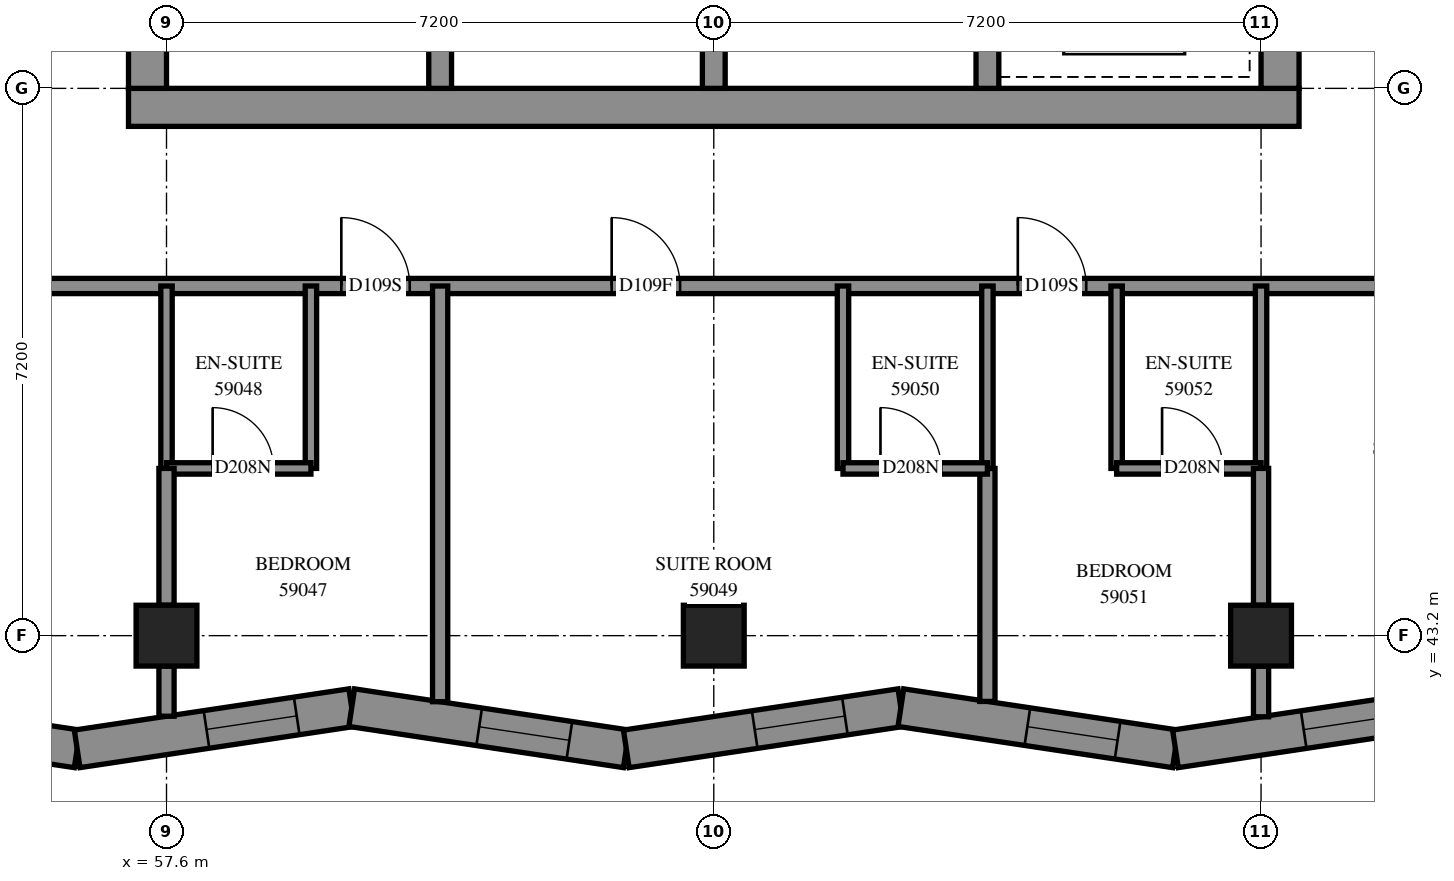
"""IFC4 building model, lengths in metres.
Left out: names, types, materials, properties, quantities, classifications, styles, units other than length and angle.
Written with IfcOpenShell. Run it as: python <this file> out.ifc"""

import sys

from ifc_helpers import new_model, si_unit, direction, frame, frame_2d, origin, origin_2d, place, context, subcontext, project, spatial, polyline, rectangle, outline, extrude, element, fill, save


model = new_model("IFC4")
c1 = context("Model", 3, precision=1e-05, world=origin(), true_north=direction((0.0, 1.0)))
c2 = subcontext(c1, "Body", "Model", "MODEL_VIEW")
j1 = project(units=[si_unit("LENGTHUNIT", "METRE"), si_unit("PLANEANGLEUNIT", "RADIAN")], contexts=[c1])
p1 = place(None, origin())
s1 = spatial("IfcSite", under=j1, at=p1, CompositionType="ELEMENT")
p2 = place(p1, origin())
s2 = spatial("IfcBuilding", under=s1, at=p2, CompositionType="ELEMENT")
p3 = place(p2, frame((0.0, 0.0, 216.8)))
s3 = spatial("IfcBuildingStorey", under=s2, at=p3, CompositionType="ELEMENT", Elevation=216.8)
for number, where, z_axis, x_axis in (
    (1, (57.6, 43.2, 0.0), (0.0, 0.0, 1.0), (1.0, 0.0, 0.0)),
    (2, (64.8, 43.2, 0.0), (0.0, 0.0, 1.0), (1.0, 0.0, 0.0)),
    (3, (72.0, 43.2, 0.0), (0.0, 0.0, 1.0), (1.0, 0.0, 0.0)),
):
    element("IfcColumn", number, at=place(p3, frame(where, z_axis=z_axis, x_axis=x_axis)), inside=s3, PredefinedType="COLUMN", context=c2, shape_type="SweptSolid", body=[
        extrude(rectangle(XDim=0.8, YDim=0.8, at=origin_2d()), origin(), (0.0, 0.0, 1.0), 3.1),
    ])
p4 = place(p3, frame((57.1, 50.15, -0.3), z_axis=(0.0, 0.0, 1.0), x_axis=(1.0, 0.0, 0.0)))
e4 = element("IfcWall", 4, at=p4, inside=s3, PredefinedType="SHEAR", context=c2, shape_type="SweptSolid", body=[
    extrude(rectangle(XDim=15.4, YDim=0.5, at=frame_2d((7.7, 0.0))), origin(), (0.0, 0.0, 1.0), 2.7),
])
p5 = place(p3, frame((57.35, 50.4, -0.3), z_axis=(0.0, 0.0, 1.0), x_axis=(0.0, 1.0, 0.0)))
e5 = element("IfcWall", 5, at=p5, inside=s3, PredefinedType="SHEAR", context=c2, shape_type="SweptSolid", body=[
    extrude(rectangle(XDim=14.4, YDim=0.5, at=frame_2d((7.2, 0.0))), origin(), (0.0, 0.0, 1.0), 2.7),
])
p6 = place(p5, frame((4.55, 0.0, 0.3)))
e6 = element("IfcOpeningElement", 6, at=p6, cuts=e5, PredefinedType="OPENING", context=c2, shape_type="SweptSolid", body=[
    extrude(rectangle(XDim=1.1, YDim=2.1, at=frame_2d((0.55, 1.05))), frame((0.0, 0.26, 0.0), z_axis=(0.0, -1.0, 0.0), x_axis=(1.0, 0.0, 0.0)), (0.0, 0.0, 1.0), 0.52),
])
p7 = place(p5, frame((11.35, 0.0, 0.3)))
e7 = element("IfcOpeningElement", 7, at=p7, cuts=e5, PredefinedType="OPENING", context=c2, shape_type="SweptSolid", body=[
    extrude(rectangle(XDim=1.1, YDim=2.1, at=frame_2d((0.55, 1.05))), frame((0.0, 0.26, 0.0), z_axis=(0.0, -1.0, 0.0), x_axis=(1.0, 0.0, 0.0)), (0.0, 0.0, 1.0), 0.52),
])
p8 = place(p3, frame((72.25, 50.4, -0.3), z_axis=(0.0, 0.0, 1.0), x_axis=(0.0, 1.0, 0.0)))
e8 = element("IfcWall", 8, at=p8, inside=s3, PredefinedType="SHEAR", context=c2, shape_type="SweptSolid", body=[
    extrude(rectangle(XDim=14.4, YDim=0.5, at=frame_2d((7.2, 0.0))), origin(), (0.0, 0.0, 1.0), 2.7),
])
p9 = place(p8, frame((4.55, 0.0, 0.3)))
e9 = element("IfcOpeningElement", 9, at=p9, cuts=e8, PredefinedType="OPENING", context=c2, shape_type="SweptSolid", body=[
    extrude(rectangle(XDim=1.1, YDim=2.1, at=frame_2d((0.55, 1.05))), frame((0.0, 0.26, 0.0), z_axis=(0.0, -1.0, 0.0), x_axis=(1.0, 0.0, 0.0)), (0.0, 0.0, 1.0), 0.52),
])
p10 = place(p8, frame((11.35, 0.0, 0.3)))
e10 = element("IfcOpeningElement", 10, at=p10, cuts=e8, PredefinedType="OPENING", context=c2, shape_type="SweptSolid", body=[
    extrude(rectangle(XDim=1.1, YDim=2.1, at=frame_2d((0.55, 1.05))), frame((0.0, 0.26, 0.0), z_axis=(0.0, -1.0, 0.0), x_axis=(1.0, 0.0, 0.0)), (0.0, 0.0, 1.0), 0.52),
])
for number, where, z_axis, x_axis in (
    (11, (61.2, 50.4, 0.0), (0.0, 0.0, 1.0), (0.0, 1.0, 0.0)),
    (12, (64.8, 50.4, 0.0), (0.0, 0.0, 1.0), (0.0, 1.0, 0.0)),
    (13, (68.4, 50.4, 0.0), (0.0, 0.0, 1.0), (0.0, 1.0, 0.0)),
):
    element("IfcWall", number, at=place(p3, frame(where, z_axis=z_axis, x_axis=x_axis)), inside=s3, PredefinedType="SOLIDWALL", context=c2, shape_type="SweptSolid", body=[
        extrude(rectangle(XDim=3.3, YDim=0.3, at=frame_2d((1.65, 0.0))), origin(), (0.0, 0.0, 1.0), 3.1),
    ])
p11 = place(p3, frame((52.792, 42.256, 0.0), z_axis=(0.0, 0.0, 1.0), x_axis=(0.9889307607, -0.1483777295, 0.0)))
e14 = element("IfcWall", 14, at=p11, inside=s3, PredefinedType="SOLIDWALL", context=c2, shape_type="SweptSolid", body=[
    extrude(outline(polyline([(0.058, -0.25), (3.711, -0.25), (3.635, 0.25), (-0.058, 0.25), (0.058, -0.25)])), origin(), (0.0, 0.0, 1.0), 3.1),
])
p12 = place(p11, frame((1.728, 0.0, 0.45)))
e15 = element("IfcOpeningElement", 15, at=p12, cuts=e14, PredefinedType="OPENING", context=c2, shape_type="SweptSolid", body=[
    extrude(rectangle(XDim=1.2, YDim=2.5, at=frame_2d((0.6, 1.25))), frame((0.0, 0.26, 0.0), z_axis=(0.0, -1.0, 0.0), x_axis=(1.0, 0.0, 0.0)), (0.0, 0.0, 1.0), 0.52),
])
p13 = place(p3, frame((56.425, 41.711, 0.0), z_axis=(0.0, 0.0, 1.0), x_axis=(0.9889295242, 0.1483859704, 0.0)))
e16 = element("IfcWall", 16, at=p13, inside=s3, PredefinedType="SOLIDWALL", context=c2, shape_type="SweptSolid", body=[
    extrude(outline(polyline([(-0.037, -0.25), (3.615, -0.25), (3.69, 0.25), (0.037, 0.25), (-0.037, -0.25)])), origin(), (0.0, 0.0, 1.0), 3.1),
])
p14 = place(p13, frame((1.721, 0.0, 0.45)))
e17 = element("IfcOpeningElement", 17, at=p14, cuts=e16, PredefinedType="OPENING", context=c2, shape_type="SweptSolid", body=[
    extrude(rectangle(XDim=1.2, YDim=2.5, at=frame_2d((0.6, 1.25))), frame((0.0, 0.26, 0.0), z_axis=(0.0, -1.0, 0.0), x_axis=(1.0, 0.0, 0.0)), (0.0, 0.0, 1.0), 0.52),
])
p15 = place(p3, frame((60.037, 42.253, 0.0), z_axis=(0.0, 0.0, 1.0), x_axis=(0.9889295242, -0.1483859704, 0.0)))
e18 = element("IfcWall", 18, at=p15, inside=s3, PredefinedType="SOLIDWALL", context=c2, shape_type="SweptSolid", body=[
    extrude(outline(polyline([(0.037, -0.25), (3.69, -0.25), (3.615, 0.25), (-0.037, 0.25), (0.037, -0.25)])), origin(), (0.0, 0.0, 1.0), 3.1),
])
p16 = place(p15, frame((1.696, 0.0, 0.45)))
e19 = element("IfcOpeningElement", 19, at=p16, cuts=e18, PredefinedType="OPENING", context=c2, shape_type="SweptSolid", body=[
    extrude(rectangle(XDim=1.2, YDim=2.5, at=frame_2d((0.6, 1.25))), frame((0.0, 0.26, 0.0), z_axis=(0.0, -1.0, 0.0), x_axis=(1.0, 0.0, 0.0)), (0.0, 0.0, 1.0), 0.52),
])
p17 = place(p3, frame((63.649, 41.711, 0.0), z_axis=(0.0, 0.0, 1.0), x_axis=(0.988930127, 0.148381953, 0.0)))
e20 = element("IfcWall", 20, at=p17, inside=s3, PredefinedType="SOLIDWALL", context=c2, shape_type="SweptSolid", body=[
    extrude(outline(polyline([(-0.037, -0.25), (3.615, -0.25), (3.69, 0.25), (0.037, 0.25), (-0.037, -0.25)])), origin(), (0.0, 0.0, 1.0), 3.1),
])
p18 = place(p17, frame((1.708, 0.0, 0.45)))
e21 = element("IfcOpeningElement", 21, at=p18, cuts=e20, PredefinedType="OPENING", context=c2, shape_type="SweptSolid", body=[
    extrude(rectangle(XDim=1.2, YDim=2.5, at=frame_2d((0.6, 1.25))), frame((0.0, 0.26, 0.0), z_axis=(0.0, -1.0, 0.0), x_axis=(1.0, 0.0, 0.0)), (0.0, 0.0, 1.0), 0.52),
])
p19 = place(p3, frame((67.261, 42.253, 0.0), z_axis=(0.0, 0.0, 1.0), x_axis=(0.9889295242, -0.1483859704, 0.0)))
e22 = element("IfcWall", 22, at=p19, inside=s3, PredefinedType="SOLIDWALL", context=c2, shape_type="SweptSolid", body=[
    extrude(outline(polyline([(0.037, -0.25), (3.69, -0.25), (3.615, 0.25), (-0.037, 0.25), (0.037, -0.25)])), origin(), (0.0, 0.0, 1.0), 3.1),
])
p20 = place(p19, frame((1.683, 0.0, 0.45)))
e23 = element("IfcOpeningElement", 23, at=p20, cuts=e22, PredefinedType="OPENING", context=c2, shape_type="SweptSolid", body=[
    extrude(rectangle(XDim=1.2, YDim=2.5, at=frame_2d((0.6, 1.25))), frame((0.0, 0.26, 0.0), z_axis=(0.0, -1.0, 0.0), x_axis=(1.0, 0.0, 0.0)), (0.0, 0.0, 1.0), 0.52),
])
p21 = place(p3, frame((70.873, 41.711, 0.0), z_axis=(0.0, 0.0, 1.0), x_axis=(0.9889307607, 0.1483777295, 0.0)))
e24 = element("IfcWall", 24, at=p21, inside=s3, PredefinedType="SOLIDWALL", context=c2, shape_type="SweptSolid", body=[
    extrude(outline(polyline([(-0.037, -0.25), (3.615, -0.25), (3.731, 0.25), (0.037, 0.25), (-0.037, -0.25)])), origin(), (0.0, 0.0, 1.0), 3.1),
])
p22 = place(p21, frame((1.706, 0.0, 0.45)))
e25 = element("IfcOpeningElement", 25, at=p22, cuts=e24, PredefinedType="OPENING", context=c2, shape_type="SweptSolid", body=[
    extrude(rectangle(XDim=1.2, YDim=2.5, at=frame_2d((0.6, 1.25))), frame((0.0, 0.26, 0.0), z_axis=(0.0, -1.0, 0.0), x_axis=(1.0, 0.0, 0.0)), (0.0, 0.0, 1.0), 0.52),
])
p23 = place(p3, frame((55.0, 47.8, 0.0), z_axis=(0.0, 0.0, 1.0), x_axis=(1.0, 0.0, 0.0)))
e26 = element("IfcWall", 26, at=p23, inside=s3, PredefinedType="PARTITIONING", context=c2, shape_type="SweptSolid", body=[
    extrude(rectangle(XDim=19.266, YDim=0.2, at=frame_2d((9.633, 0.0))), origin(), (0.0, 0.0, 1.0), 3.1),
])
p24 = place(p23, frame((4.9, 0.0, 0.0)))
e27 = element("IfcOpeningElement", 27, at=p24, cuts=e26, PredefinedType="OPENING", context=c2, shape_type="SweptSolid", body=[
    extrude(rectangle(XDim=0.9, YDim=2.1, at=frame_2d((0.45, 1.05))), frame((0.0, 0.11, 0.0), z_axis=(0.0, -1.0, 0.0), x_axis=(1.0, 0.0, 0.0)), (0.0, 0.0, 1.0), 0.22),
])
p25 = place(p23, frame((8.457, 0.0, 0.0)))
e28 = element("IfcOpeningElement", 28, at=p25, cuts=e26, PredefinedType="OPENING", context=c2, shape_type="SweptSolid", body=[
    extrude(rectangle(XDim=0.9, YDim=2.1, at=frame_2d((0.45, 1.05))), frame((0.0, 0.11, 0.0), z_axis=(0.0, -1.0, 0.0), x_axis=(1.0, 0.0, 0.0)), (0.0, 0.0, 1.0), 0.22),
])
p26 = place(p23, frame((13.8, 0.0, 0.0)))
e29 = element("IfcOpeningElement", 29, at=p26, cuts=e26, PredefinedType="OPENING", context=c2, shape_type="SweptSolid", body=[
    extrude(rectangle(XDim=0.9, YDim=2.1, at=frame_2d((0.45, 1.05))), frame((0.0, 0.11, 0.0), z_axis=(0.0, -1.0, 0.0), x_axis=(1.0, 0.0, 0.0)), (0.0, 0.0, 1.0), 0.22),
])
p27 = place(p3, frame((61.2, 42.331, 0.0), z_axis=(0.0, 0.0, 1.0), x_axis=(0.0, 1.0, 0.0)))
e30 = element("IfcWall", 30, at=p27, inside=s3, PredefinedType="PARTITIONING", context=c2, shape_type="SweptSolid", body=[
    extrude(rectangle(XDim=5.469, YDim=0.2, at=frame_2d((2.734, 0.0))), origin(), (0.0, 0.0, 1.0), 3.1),
])
p28 = place(p3, frame((68.4, 42.335, 0.0), z_axis=(0.0, 0.0, 1.0), x_axis=(0.0, 1.0, 0.0)))
e31 = element("IfcWall", 31, at=p28, inside=s3, PredefinedType="PARTITIONING", context=c2, shape_type="SweptSolid", body=[
    extrude(rectangle(XDim=3.065, YDim=0.2, at=frame_2d((1.533, 0.0))), origin(), (0.0, 0.0, 1.0), 3.1),
])
for number, where, z_axis, x_axis in (
    (32, (59.5, 45.4, 0.0), (0.0, 0.0, 1.0), (0.0, 1.0, 0.0)),
    (33, (57.6, 45.4, 0.0), (0.0, 0.0, 1.0), (0.0, 1.0, 0.0)),
    (34, (66.5, 45.4, 0.0), (0.0, 0.0, 1.0), (0.0, 1.0, 0.0)),
    (35, (68.4, 45.4, 0.0), (0.0, 0.0, 1.0), (0.0, 1.0, 0.0)),
    (36, (70.1, 45.4, 0.0), (0.0, 0.0, 1.0), (0.0, 1.0, 0.0)),
    (37, (72.0, 45.4, 0.0), (0.0, 0.0, 1.0), (0.0, 1.0, 0.0)),
):
    element("IfcWall", number, at=place(p3, frame(where, z_axis=z_axis, x_axis=x_axis)), inside=s3, PredefinedType="PARTITIONING", context=c2, shape_type="SweptSolid", body=[
        extrude(rectangle(XDim=2.4, YDim=0.15, at=frame_2d((1.2, 0.0))), origin(), (0.0, 0.0, 1.0), 3.1),
    ])
p29 = place(p3, frame((66.5, 45.4, 0.0), z_axis=(0.0, 0.0, 1.0), x_axis=(1.0, 0.0, 0.0)))
e38 = element("IfcWall", 38, at=p29, inside=s3, PredefinedType="PARTITIONING", context=c2, shape_type="SweptSolid", body=[
    extrude(rectangle(XDim=1.9, YDim=0.15, at=frame_2d((0.95, 0.0))), origin(), (0.0, 0.0, 1.0), 3.1),
])
p30 = place(p29, frame((0.493, 0.0, 0.0)))
e39 = element("IfcOpeningElement", 39, at=p30, cuts=e38, PredefinedType="OPENING", context=c2, shape_type="SweptSolid", body=[
    extrude(rectangle(XDim=0.8, YDim=2.1, at=frame_2d((0.4, 1.05))), frame((0.0, 0.085, 0.0), z_axis=(0.0, -1.0, 0.0), x_axis=(1.0, 0.0, 0.0)), (0.0, 0.0, 1.0), 0.17),
])
p31 = place(p3, frame((70.1, 45.4, 0.0), z_axis=(0.0, 0.0, 1.0), x_axis=(1.0, 0.0, 0.0)))
e40 = element("IfcWall", 40, at=p31, inside=s3, PredefinedType="PARTITIONING", context=c2, shape_type="SweptSolid", body=[
    extrude(rectangle(XDim=1.9, YDim=0.15, at=frame_2d((0.95, 0.0))), origin(), (0.0, 0.0, 1.0), 3.1),
])
p32 = place(p31, frame((0.598, 0.0, 0.0)))
e41 = element("IfcOpeningElement", 41, at=p32, cuts=e40, PredefinedType="OPENING", context=c2, shape_type="SweptSolid", body=[
    extrude(rectangle(XDim=0.8, YDim=2.1, at=frame_2d((0.4, 1.05))), frame((0.0, 0.085, 0.0), z_axis=(0.0, -1.0, 0.0), x_axis=(1.0, 0.0, 0.0)), (0.0, 0.0, 1.0), 0.17),
])
p33 = place(p3, frame((57.6, 45.4, 0.0), z_axis=(0.0, 0.0, 1.0), x_axis=(1.0, 0.0, 0.0)))
e42 = element("IfcWall", 42, at=p33, inside=s3, PredefinedType="PARTITIONING", context=c2, shape_type="SweptSolid", body=[
    extrude(rectangle(XDim=1.9, YDim=0.15, at=frame_2d((0.95, 0.0))), origin(), (0.0, 0.0, 1.0), 3.1),
])
p34 = place(p33, frame((0.607, 0.0, 0.0)))
e43 = element("IfcOpeningElement", 43, at=p34, cuts=e42, PredefinedType="OPENING", context=c2, shape_type="SweptSolid", body=[
    extrude(rectangle(XDim=0.8, YDim=2.1, at=frame_2d((0.4, 1.05))), frame((0.0, 0.085, 0.0), z_axis=(0.0, -1.0, 0.0), x_axis=(1.0, 0.0, 0.0)), (0.0, 0.0, 1.0), 0.17),
])
for number, where, z_axis, x_axis in (
    (44, (57.6, 43.6, 0.0), (0.0, 0.0, 1.0), (0.0, 1.0, 0.0)),
    (45, (72.0, 43.6, 0.0), (0.0, 0.0, 1.0), (0.0, 1.0, 0.0)),
):
    element("IfcWall", number, at=place(p3, frame(where, z_axis=z_axis, x_axis=x_axis)), inside=s3, PredefinedType="PARTITIONING", context=c2, shape_type="SweptSolid", body=[
        extrude(rectangle(XDim=1.8, YDim=0.2, at=frame_2d((0.9, 0.0))), origin(), (0.0, 0.0, 1.0), 3.1),
    ])
p35 = place(p3, frame((72.0, 42.133, 0.0), z_axis=(0.0, 0.0, 1.0), x_axis=(0.0, 1.0, 0.0)))
e46 = element("IfcWall", 46, at=p35, inside=s3, PredefinedType="PARTITIONING", context=c2, shape_type="SweptSolid", body=[
    extrude(rectangle(XDim=0.667, YDim=0.2, at=frame_2d((0.334, 0.0))), origin(), (0.0, 0.0, 1.0), 3.1),
])
p36 = place(p3, frame((57.6, 42.14, 0.0), z_axis=(0.0, 0.0, 1.0), x_axis=(0.0, 1.0, 0.0)))
e47 = element("IfcWall", 47, at=p36, inside=s3, PredefinedType="PARTITIONING", context=c2, shape_type="SweptSolid", body=[
    extrude(rectangle(XDim=0.66, YDim=0.2, at=frame_2d((0.33, 0.0))), origin(), (0.0, 0.0, 1.0), 3.1),
])
p37 = place(p14, origin())
e48 = element("IfcWindow", 48, at=p37, inside=s3, PartitioningType="SINGLE_PANEL", PredefinedType="WINDOW", context=c2, shape_type="SweptSolid", body=[
    extrude(rectangle(XDim=1.2, YDim=2.5, at=frame_2d((0.6, 1.25))), frame((0.0, 0.18, 0.0), z_axis=(0.0, -1.0, 0.0), x_axis=(1.0, 0.0, 0.0)), (0.0, 0.0, 1.0), 0.06),
])
fill(e17, e48)
p38 = place(p16, origin())
e49 = element("IfcWindow", 49, at=p38, inside=s3, PartitioningType="SINGLE_PANEL", PredefinedType="WINDOW", context=c2, shape_type="SweptSolid", body=[
    extrude(rectangle(XDim=1.2, YDim=2.5, at=frame_2d((0.6, 1.25))), frame((0.0, 0.18, 0.0), z_axis=(0.0, -1.0, 0.0), x_axis=(1.0, 0.0, 0.0)), (0.0, 0.0, 1.0), 0.06),
])
fill(e19, e49)
p39 = place(p18, origin())
e50 = element("IfcWindow", 50, at=p39, inside=s3, PartitioningType="SINGLE_PANEL", PredefinedType="WINDOW", context=c2, shape_type="SweptSolid", body=[
    extrude(rectangle(XDim=1.2, YDim=2.5, at=frame_2d((0.6, 1.25))), frame((0.0, 0.18, 0.0), z_axis=(0.0, -1.0, 0.0), x_axis=(1.0, 0.0, 0.0)), (0.0, 0.0, 1.0), 0.06),
])
fill(e21, e50)
p40 = place(p20, origin())
e51 = element("IfcWindow", 51, at=p40, inside=s3, PartitioningType="SINGLE_PANEL", PredefinedType="WINDOW", context=c2, shape_type="SweptSolid", body=[
    extrude(rectangle(XDim=1.2, YDim=2.5, at=frame_2d((0.6, 1.25))), frame((0.0, 0.18, 0.0), z_axis=(0.0, -1.0, 0.0), x_axis=(1.0, 0.0, 0.0)), (0.0, 0.0, 1.0), 0.06),
])
fill(e23, e51)
p41 = place(p22, origin())
e52 = element("IfcWindow", 52, at=p41, inside=s3, PartitioningType="SINGLE_PANEL", PredefinedType="WINDOW", context=c2, shape_type="SweptSolid", body=[
    extrude(rectangle(XDim=1.2, YDim=2.5, at=frame_2d((0.6, 1.25))), frame((0.0, 0.18, 0.0), z_axis=(0.0, -1.0, 0.0), x_axis=(1.0, 0.0, 0.0)), (0.0, 0.0, 1.0), 0.06),
])
fill(e25, e52)
p42 = place(p24, origin())
e53 = element("IfcDoor", 53, at=p42, inside=s3, OperationType="SINGLE_SWING_LEFT", PredefinedType="DOOR", context=c2, shape_type="SweptSolid", body=[
    extrude(rectangle(XDim=0.9, YDim=2.1, at=frame_2d((0.45, 1.05))), frame((0.0, 0.025, 0.0), z_axis=(0.0, -1.0, 0.0), x_axis=(1.0, 0.0, 0.0)), (0.0, 0.0, 1.0), 0.05),
])
fill(e27, e53)
p43 = place(p34, origin())
e54 = element("IfcDoor", 54, at=p43, inside=s3, OperationType="SINGLE_SWING_RIGHT", PredefinedType="DOOR", context=c2, shape_type="SweptSolid", body=[
    extrude(rectangle(XDim=0.8, YDim=2.1, at=frame_2d((0.4, 1.05))), frame((0.0, 0.025, 0.0), z_axis=(0.0, -1.0, 0.0), x_axis=(1.0, 0.0, 0.0)), (0.0, 0.0, 1.0), 0.05),
])
fill(e43, e54)
p44 = place(p25, origin())
e55 = element("IfcDoor", 55, at=p44, inside=s3, OperationType="SINGLE_SWING_RIGHT", PredefinedType="DOOR", context=c2, shape_type="SweptSolid", body=[
    extrude(rectangle(XDim=0.9, YDim=2.1, at=frame_2d((0.45, 1.05))), frame((0.0, 0.025, 0.0), z_axis=(0.0, -1.0, 0.0), x_axis=(1.0, 0.0, 0.0)), (0.0, 0.0, 1.0), 0.05),
])
fill(e28, e55)
p45 = place(p30, origin())
e56 = element("IfcDoor", 56, at=p45, inside=s3, OperationType="SINGLE_SWING_RIGHT", PredefinedType="DOOR", context=c2, shape_type="SweptSolid", body=[
    extrude(rectangle(XDim=0.8, YDim=2.1, at=frame_2d((0.4, 1.05))), frame((0.0, 0.025, 0.0), z_axis=(0.0, -1.0, 0.0), x_axis=(1.0, 0.0, 0.0)), (0.0, 0.0, 1.0), 0.05),
])
fill(e39, e56)
p46 = place(p26, origin())
e57 = element("IfcDoor", 57, at=p46, inside=s3, OperationType="SINGLE_SWING_RIGHT", PredefinedType="DOOR", context=c2, shape_type="SweptSolid", body=[
    extrude(rectangle(XDim=0.9, YDim=2.1, at=frame_2d((0.45, 1.05))), frame((0.0, 0.025, 0.0), z_axis=(0.0, -1.0, 0.0), x_axis=(1.0, 0.0, 0.0)), (0.0, 0.0, 1.0), 0.05),
])
fill(e29, e57)
p47 = place(p32, origin())
e58 = element("IfcDoor", 58, at=p47, inside=s3, OperationType="SINGLE_SWING_RIGHT", PredefinedType="DOOR", context=c2, shape_type="SweptSolid", body=[
    extrude(rectangle(XDim=0.8, YDim=2.1, at=frame_2d((0.4, 1.05))), frame((0.0, 0.025, 0.0), z_axis=(0.0, -1.0, 0.0), x_axis=(1.0, 0.0, 0.0)), (0.0, 0.0, 1.0), 0.05),
])
fill(e41, e58)
save(model, sys.argv[1])
